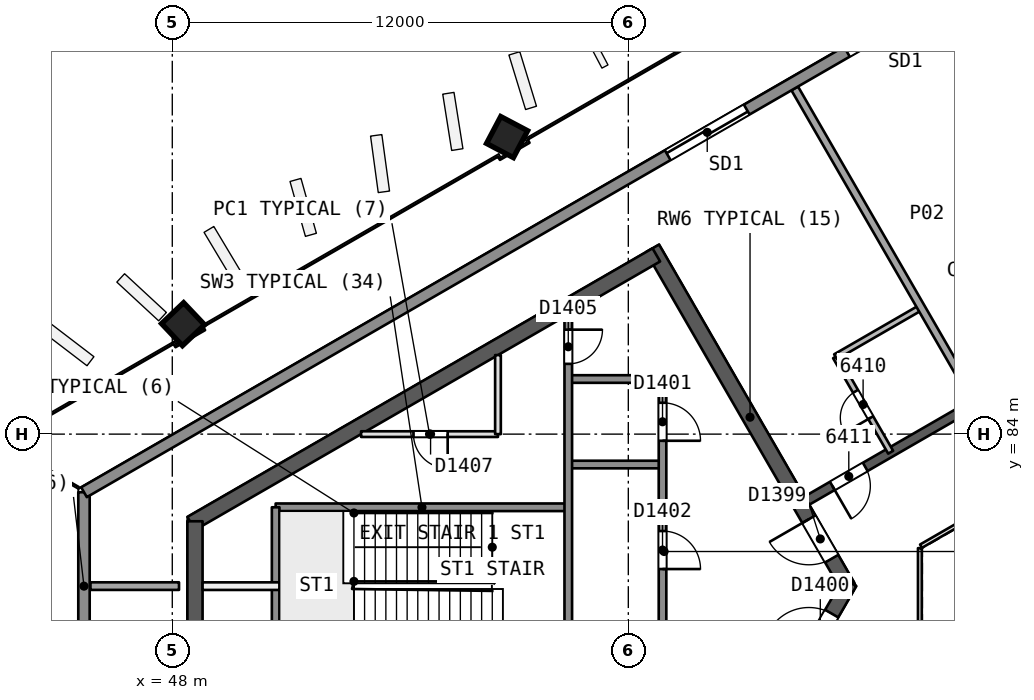
"""IFC4 building model, lengths in metres.
Left out: names, types, materials, properties, quantities, classifications, styles, units other than length and angle.
Written with IfcOpenShell. Run it as: python <this file> out.ifc"""

import sys

from ifc_helpers import new_model, si_unit, direction, frame, frame_2d, origin, origin_2d, place, context, subcontext, project, spatial, rectangle, extrude, element, fill, save


model = new_model("IFC4")
c1 = context("Model", 3, precision=1e-05, world=origin(), true_north=direction((0.0, 1.0)))
c2 = subcontext(c1, "Body", "Model", "MODEL_VIEW")
j1 = project(units=[si_unit("LENGTHUNIT", "METRE"), si_unit("PLANEANGLEUNIT", "RADIAN")], contexts=[c1])
p1 = place(None, origin())
s1 = spatial("IfcSite", under=j1, at=p1, CompositionType="ELEMENT")
p2 = place(p1, origin())
s2 = spatial("IfcBuilding", under=s1, at=p2, CompositionType="ELEMENT")
p3 = place(p2, frame((0.0, 0.0, 262.7)))
s3 = spatial("IfcBuildingStorey", under=s2, at=p3, CompositionType="ELEMENT", Elevation=262.7)
p4 = place(p3, frame((65.769, 80.0, 0.0), z_axis=(0.0, 0.0, 1.0), x_axis=(-0.50000177223, 0.866024380585, 0.0)))
e1 = element("IfcWall", 1, at=p4, inside=s3, PredefinedType="SHEAR", context=c2, shape_type="SweptSolid", body=[
    extrude(rectangle(XDim=10.265, YDim=0.4, at=frame_2d((5.132, 0.0))), origin(), (0.0, 0.0, 1.0), 3.7),
])
p5 = place(p4, frame((0.834, 0.0, 0.0)))
e2 = element("IfcOpeningElement", 2, at=p5, cuts=e1, PredefinedType="OPENING", context=c2, shape_type="SweptSolid", body=[
    extrude(rectangle(XDim=1.2, YDim=2.1, at=frame_2d((0.6, 1.05))), frame((0.0, 0.21, 0.0), z_axis=(0.0, -1.0, 0.0), x_axis=(1.0, 0.0, 0.0)), (0.0, 0.0, 1.0), 0.421),
])
p6 = place(p3, frame((60.737, 88.716, 0.0), z_axis=(0.0, 0.0, 1.0), x_axis=(-0.866028812667, -0.499994095595, 0.0)))
e3 = element("IfcWall", 3, at=p6, inside=s3, PredefinedType="SHEAR", context=c2, shape_type="SweptSolid", body=[
    extrude(rectangle(XDim=14.134, YDim=0.4, at=frame_2d((7.067, 0.0))), origin(), (0.0, 0.0, 1.0), 3.7),
])
p7 = place(p3, frame((48.597, 81.707, 0.0), z_axis=(0.0, 0.0, 1.0), x_axis=(0.0, -1.0, 0.0)))
e4 = element("IfcWall", 4, at=p7, inside=s3, PredefinedType="SHEAR", context=c2, shape_type="SweptSolid", body=[
    extrude(rectangle(XDim=3.53, YDim=0.4, at=frame_2d((1.765, 0.0))), origin(), (0.0, 0.0, 1.0), 3.7),
])
p8 = place(p3, frame((60.737, 71.284, 0.0), z_axis=(0.0, 0.0, 1.0), x_axis=(0.50000547566, 0.866022242388, 0.0)))
e5 = element("IfcWall", 5, at=p8, inside=s3, PredefinedType="SHEAR", context=c2, shape_type="SweptSolid", body=[
    extrude(rectangle(XDim=10.18, YDim=0.4, at=frame_2d((5.09, 0.0))), origin(), (0.0, 0.0, 1.0), 3.7),
])
p9 = place(p8, frame((8.03, 0.0, 0.0)))
e6 = element("IfcOpeningElement", 6, at=p9, cuts=e5, PredefinedType="OPENING", context=c2, shape_type="SweptSolid", body=[
    extrude(rectangle(XDim=1.2, YDim=2.1, at=frame_2d((0.6, 1.05))), frame((0.0, 0.21, 0.0), z_axis=(0.0, -1.0, 0.0), x_axis=(1.0, 0.0, 0.0)), (0.0, 0.0, 1.0), 0.421),
])
p10 = place(p3, frame((78.2, 90.046, 0.0), z_axis=(0.0, 0.0, 1.0), x_axis=(-0.866026492143, -0.499998114903, 0.0)))
e7 = element("IfcWall", 7, at=p10, inside=s3, PredefinedType="SHEAR", context=c2, shape_type="SweptSolid", body=[
    extrude(rectangle(XDim=15.588, YDim=0.25, at=frame_2d((7.794, 0.0))), origin(), (0.0, 0.0, 1.0), 3.3),
])
p11 = place(p10, frame((7.072, 0.0, 0.0)))
e8 = element("IfcOpeningElement", 8, at=p11, cuts=e7, PredefinedType="OPENING", context=c2, shape_type="SweptSolid", body=[
    extrude(rectangle(XDim=1.0, YDim=2.1, at=frame_2d((0.5, 1.05))), frame((0.0, 0.135, 0.0), z_axis=(0.0, -1.0, 0.0), x_axis=(1.0, 0.0, 0.0)), (0.0, 0.0, 1.0), 0.271),
])
p12 = place(p10, frame((13.816, 0.0, 0.0)))
e9 = element("IfcOpeningElement", 9, at=p12, cuts=e7, PredefinedType="OPENING", context=c2, shape_type="SweptSolid", body=[
    extrude(rectangle(XDim=1.0, YDim=2.1, at=frame_2d((0.5, 1.05))), frame((0.0, 0.135, 0.0), z_axis=(0.0, -1.0, 0.0), x_axis=(1.0, 0.0, 0.0)), (0.0, 0.0, 1.0), 0.271),
])
p13 = place(p3, frame((56.786, 91.83, 0.0), z_axis=(0.019328516974, -0.012138044789, 0.999739504221), x_axis=(-0.500200160538, 0.865674608258, 0.020180981521)))
e10 = element("IfcColumn", 10, at=p13, inside=s3, PredefinedType="COLUMN", context=c2, shape_type="SweptSolid", body=[
    extrude(rectangle(XDim=0.8, YDim=0.8, at=origin_2d()), origin(), (0.0, 0.0, 1.0), 3.701),
])
p14 = place(p3, frame((48.249, 86.901, 0.0), z_axis=(0.02855911485, -0.006793507689, 0.999569019734), x_axis=(-0.500405785832, 0.865555785013, 0.020180003373)))
e11 = element("IfcColumn", 11, at=p14, inside=s3, PredefinedType="COLUMN", context=c2, shape_type="SweptSolid", body=[
    extrude(rectangle(XDim=0.8, YDim=0.8, at=origin_2d()), origin(), (0.0, 0.0, 1.0), 3.702),
])
p15 = place(p3, frame((64.378, 93.097, 0.0), z_axis=(0.0, 0.0, 1.0), x_axis=(0.500006352507, -0.866021736132, 0.0)))
e12 = element("IfcWall", 12, at=p15, inside=s3, PredefinedType="PARTITIONING", context=c2, shape_type="SweptSolid", body=[
    extrude(rectangle(XDim=9.553, YDim=0.2, at=frame_2d((4.777, 0.0))), origin(), (0.0, 0.0, 1.0), 3.3),
])
p16 = place(p3, frame((66.903, 83.524, 0.0), z_axis=(0.0, 0.0, 1.0), x_axis=(-0.499987231761, 0.866032775405, 0.0)))
e13 = element("IfcWall", 13, at=p16, inside=s3, PredefinedType="PARTITIONING", context=c2, shape_type="SweptSolid", body=[
    extrude(rectangle(XDim=2.9, YDim=0.15, at=frame_2d((1.45, 0.0))), origin(), (0.0, 0.0, 1.0), 3.3),
])
p17 = place(p16, frame((1.05, 0.0, 0.0)))
e14 = element("IfcOpeningElement", 14, at=p17, cuts=e13, PredefinedType="OPENING", context=c2, shape_type="SweptSolid", body=[
    extrude(rectangle(XDim=0.8, YDim=2.1, at=frame_2d((0.4, 1.05))), frame((0.0, 0.085, 0.0), z_axis=(0.0, -1.0, 0.0), x_axis=(1.0, 0.0, 0.0)), (0.0, 0.0, 1.0), 0.171),
])
p18 = place(p3, frame((65.453, 86.035, 0.0), z_axis=(0.0, 0.0, 1.0), x_axis=(0.866021400173, 0.500006934395, 0.0)))
e15 = element("IfcWall", 15, at=p18, inside=s3, PredefinedType="PARTITIONING", context=c2, shape_type="SweptSolid", body=[
    extrude(rectangle(XDim=2.6, YDim=0.15, at=frame_2d((1.3, 0.0))), origin(), (0.0, 0.0, 1.0), 3.3),
])
p19 = place(p3, frame((45.846, 80.001, 0.0), z_axis=(0.0, 0.0, 1.0), x_axis=(1.0, 0.0, 0.0)))
e16 = element("IfcWall", 16, at=p19, inside=s3, PredefinedType="PARTITIONING", context=c2, shape_type="SweptSolid", body=[
    extrude(rectangle(XDim=2.331, YDim=0.2, at=frame_2d((1.165, 0.0))), origin(), (0.0, 0.0, 1.0), 3.3),
])
p20 = place(p3, frame((45.676, 77.529, 0.0), z_axis=(0.0, 0.0, 1.0), x_axis=(0.0, 1.0, 0.0)))
e17 = element("IfcWall", 17, at=p20, inside=s3, PredefinedType="SOLIDWALL", context=c2, shape_type="SweptSolid", body=[
    extrude(rectangle(XDim=4.943, YDim=0.3, at=frame_2d((2.471, 0.0))), origin(), (0.0, 0.0, 1.0), 3.3),
])
p21 = place(p3, frame((45.676, 82.471, 0.0), z_axis=(0.0, 0.0, 1.0), x_axis=(0.866026894696, 0.499997417657, 0.0)))
e18 = element("IfcWall", 18, at=p21, inside=s3, PredefinedType="SOLIDWALL", context=c2, shape_type="SweptSolid", body=[
    extrude(rectangle(XDim=48.319, YDim=0.3, at=frame_2d((24.159, 0.0))), origin(), (0.0, 0.0, 1.0), 3.3),
])
p22 = place(p21, frame((39.279, 0.0, 0.9)))
e19 = element("IfcOpeningElement", 19, at=p22, cuts=e18, PredefinedType="OPENING", context=c2, shape_type="SweptSolid", body=[
    extrude(rectangle(XDim=1.8, YDim=1.5, at=frame_2d((0.9, 0.75))), frame((0.0, 0.161, 0.0), z_axis=(0.0, -1.0, 0.0), x_axis=(1.0, 0.0, 0.0)), (0.0, 0.0, 1.0), 0.321),
])
p23 = place(p21, frame((28.404, 0.0, 0.0)))
e20 = element("IfcOpeningElement", 20, at=p23, cuts=e18, PredefinedType="OPENING", context=c2, shape_type="SweptSolid", body=[
    extrude(rectangle(XDim=2.4, YDim=2.4, at=frame_2d((1.2, 1.2))), frame((0.0, 0.161, 0.0), z_axis=(0.0, -1.0, 0.0), x_axis=(1.0, 0.0, 0.0)), (0.0, 0.0, 1.0), 0.321),
])
p24 = place(p21, frame((23.181, 0.0, 0.0)))
e21 = element("IfcOpeningElement", 21, at=p24, cuts=e18, PredefinedType="OPENING", context=c2, shape_type="SweptSolid", body=[
    extrude(rectangle(XDim=2.4, YDim=2.4, at=frame_2d((1.2, 1.2))), frame((0.0, 0.161, 0.0), z_axis=(0.0, -1.0, 0.0), x_axis=(1.0, 0.0, 0.0)), (0.0, 0.0, 1.0), 0.321),
])
p25 = place(p21, frame((17.737, 0.0, 0.0)))
e22 = element("IfcOpeningElement", 22, at=p25, cuts=e18, PredefinedType="OPENING", context=c2, shape_type="SweptSolid", body=[
    extrude(rectangle(XDim=2.4, YDim=2.4, at=frame_2d((1.2, 1.2))), frame((0.0, 0.161, 0.0), z_axis=(0.0, -1.0, 0.0), x_axis=(1.0, 0.0, 0.0)), (0.0, 0.0, 1.0), 0.321),
])
p26 = place(p3, frame((60.9, 85.45, 0.0), z_axis=(0.0, 0.0, 1.0), x_axis=(-1.0, 0.0, 0.0)))
e23 = element("IfcWall", 23, at=p26, inside=s3, PredefinedType="SOLIDWALL", context=c2, shape_type="SweptSolid", body=[
    extrude(rectangle(XDim=2.48, YDim=0.2, at=frame_2d((1.24, 0.0))), origin(), (0.0, 0.0, 1.0), 3.3),
])
p27 = place(p3, frame((56.57, 84.0, 0.0), z_axis=(0.0, 0.0, 1.0), x_axis=(-1.0, 0.0, 0.0)))
e24 = element("IfcWall", 24, at=p27, inside=s3, PredefinedType="PARTITIONING", context=c2, shape_type="SweptSolid", body=[
    extrude(rectangle(XDim=3.602, YDim=0.15, at=frame_2d((1.801, 0.0))), origin(), (0.0, 0.0, 1.0), 3.3),
])
p28 = place(p27, frame((1.323, 0.0, 0.0)))
e25 = element("IfcOpeningElement", 25, at=p28, cuts=e24, PredefinedType="OPENING", context=c2, shape_type="SweptSolid", body=[
    extrude(rectangle(XDim=0.9, YDim=2.1, at=frame_2d((0.45, 1.05))), frame((0.0, 0.085, 0.0), z_axis=(0.0, -1.0, 0.0), x_axis=(1.0, 0.0, 0.0)), (0.0, 0.0, 1.0), 0.171),
])
p29 = place(p3, frame((60.9, 83.2, 0.0), z_axis=(0.0, 0.0, 1.0), x_axis=(-1.0, 0.0, 0.0)))
e26 = element("IfcWall", 26, at=p29, inside=s3, PredefinedType="SOLIDWALL", context=c2, shape_type="SweptSolid", body=[
    extrude(rectangle(XDim=2.48, YDim=0.2, at=frame_2d((1.24, 0.0))), origin(), (0.0, 0.0, 1.0), 3.3),
])
p30 = place(p3, frame((58.42, 82.075, 0.0), z_axis=(0.0, 0.0, 1.0), x_axis=(-1.0, 0.0, 0.0)))
e27 = element("IfcWall", 27, at=p30, inside=s3, PredefinedType="SOLIDWALL", context=c2, shape_type="SweptSolid", body=[
    extrude(rectangle(XDim=7.7, YDim=0.2, at=frame_2d((3.85, 0.0))), origin(), (0.0, 0.0, 1.0), 3.3),
])
p31 = place(p3, frame((50.82, 80.0, 0.0), z_axis=(0.0, 0.0, 1.0), x_axis=(-1.0, 0.0, 0.0)))
e28 = element("IfcWall", 28, at=p31, inside=s3, PredefinedType="PARTITIONING", context=c2, shape_type="SweptSolid", body=[
    extrude(rectangle(XDim=2.023, YDim=0.2, at=frame_2d((1.012, 0.0))), origin(), (0.0, 0.0, 1.0), 3.3),
])
p32 = place(p3, frame((60.9, 85.45, 0.0), z_axis=(0.0, 0.0, 1.0), x_axis=(0.0, -1.0, 0.0)))
e29 = element("IfcWall", 29, at=p32, inside=s3, PredefinedType="SOLIDWALL", context=c2, shape_type="SweptSolid", body=[
    extrude(rectangle(XDim=10.9, YDim=0.2, at=frame_2d((5.45, 0.0))), origin(), (0.0, 0.0, 1.0), 3.3),
])
p33 = place(p32, frame((0.625, 0.0, 0.0)))
e30 = element("IfcOpeningElement", 30, at=p33, cuts=e29, PredefinedType="OPENING", context=c2, shape_type="SweptSolid", body=[
    extrude(rectangle(XDim=1.0, YDim=2.1, at=frame_2d((0.5, 1.05))), frame((0.0, 0.11, 0.0), z_axis=(0.0, -1.0, 0.0), x_axis=(1.0, 0.0, 0.0)), (0.0, 0.0, 1.0), 0.221),
])
p34 = place(p32, frame((4.0, 0.0, 0.0)))
e31 = element("IfcOpeningElement", 31, at=p34, cuts=e29, PredefinedType="OPENING", context=c2, shape_type="SweptSolid", body=[
    extrude(rectangle(XDim=1.0, YDim=2.1, at=frame_2d((0.5, 1.05))), frame((0.0, 0.11, 0.0), z_axis=(0.0, -1.0, 0.0), x_axis=(1.0, 0.0, 0.0)), (0.0, 0.0, 1.0), 0.221),
])
p35 = place(p32, frame((7.375, 0.0, 0.0)))
e32 = element("IfcOpeningElement", 32, at=p35, cuts=e29, PredefinedType="OPENING", context=c2, shape_type="SweptSolid", body=[
    extrude(rectangle(XDim=1.0, YDim=2.1, at=frame_2d((0.5, 1.05))), frame((0.0, 0.11, 0.0), z_axis=(0.0, -1.0, 0.0), x_axis=(1.0, 0.0, 0.0)), (0.0, 0.0, 1.0), 0.221),
])
p36 = place(p3, frame((58.42, 87.148, 0.0), z_axis=(0.0, 0.0, 1.0), x_axis=(0.0, -1.0, 0.0)))
e33 = element("IfcWall", 33, at=p36, inside=s3, PredefinedType="SOLIDWALL", context=c2, shape_type="SweptSolid", body=[
    extrude(rectangle(XDim=10.698, YDim=0.2, at=frame_2d((5.349, 0.0))), origin(), (0.0, 0.0, 1.0), 3.3),
])
p37 = place(p36, frame((0.399, 0.0, 0.0)))
e34 = element("IfcOpeningElement", 34, at=p37, cuts=e33, PredefinedType="OPENING", context=c2, shape_type="SweptSolid", body=[
    extrude(rectangle(XDim=0.9, YDim=2.1, at=frame_2d((0.45, 1.05))), frame((0.0, 0.11, 0.0), z_axis=(0.0, -1.0, 0.0), x_axis=(1.0, 0.0, 0.0)), (0.0, 0.0, 1.0), 0.221),
])
p38 = place(p3, frame((56.57, 86.08, 0.0), z_axis=(0.0, 0.0, 1.0), x_axis=(0.0, -1.0, 0.0)))
e35 = element("IfcWall", 35, at=p38, inside=s3, PredefinedType="PARTITIONING", context=c2, shape_type="SweptSolid", body=[
    extrude(rectangle(XDim=2.08, YDim=0.15, at=frame_2d((1.04, 0.0))), origin(), (0.0, 0.0, 1.0), 3.3),
])
p39 = place(p3, frame((50.72, 82.075, 0.0), z_axis=(0.0, 0.0, 1.0), x_axis=(0.0, -1.0, 0.0)))
e36 = element("IfcWall", 36, at=p39, inside=s3, PredefinedType="SOLIDWALL", context=c2, shape_type="SweptSolid", body=[
    extrude(rectangle(XDim=4.15, YDim=0.2, at=frame_2d((2.075, 0.0))), origin(), (0.0, 0.0, 1.0), 3.3),
])
p40 = place(p3, frame((77.738, 86.846, 0.0), z_axis=(0.0, 0.0, 1.0), x_axis=(-0.866026658274, -0.499997827154, 0.0)))
e37 = element("IfcWall", 37, at=p40, inside=s3, PredefinedType="PARTITIONING", context=c2, shape_type="SweptSolid", body=[
    extrude(rectangle(XDim=11.588, YDim=0.1, at=frame_2d((5.794, 0.0))), origin(), (0.0, 0.0, 1.0), 3.3),
])
p41 = place(p3, frame((67.672, 81.0, 0.0), z_axis=(0.0, 0.0, 1.0), x_axis=(0.0, -1.0, 0.0)))
e38 = element("IfcWall", 38, at=p41, inside=s3, PredefinedType="PARTITIONING", context=c2, shape_type="SweptSolid", body=[
    extrude(rectangle(XDim=2.0, YDim=0.1, at=frame_2d((1.0, 0.0))), origin(), (0.0, 0.0, 1.0), 3.3),
])
p42 = place(p17, origin())
e39 = element("IfcDoor", 39, at=p42, inside=s3, OperationType="SINGLE_SWING_LEFT", PredefinedType="NOTDEFINED", context=c2, shape_type="SweptSolid", body=[
    extrude(rectangle(XDim=0.8, YDim=2.1, at=frame_2d((0.4, 1.05))), frame((0.0, 0.025, 0.0), z_axis=(0.0, -1.0, 0.0), x_axis=(1.0, 0.0, 0.0)), (0.0, 0.0, 1.0), 0.05),
])
fill(e14, e39)
p43 = place(p12, origin())
e40 = element("IfcDoor", 40, at=p43, inside=s3, OperationType="SINGLE_SWING_RIGHT", PredefinedType="NOTDEFINED", context=c2, shape_type="SweptSolid", body=[
    extrude(rectangle(XDim=1.0, YDim=2.1, at=frame_2d((0.5, 1.05))), frame((0.0, 0.025, 0.0), z_axis=(0.0, -1.0, 0.0), x_axis=(1.0, 0.0, 0.0)), (0.0, 0.0, 1.0), 0.05),
])
fill(e9, e40)
p44 = place(p24, origin())
e41 = element("IfcDoor", 41, at=p44, inside=s3, OperationType="SLIDING_TO_RIGHT", PredefinedType="NOTDEFINED", context=c2, shape_type="SweptSolid", body=[
    extrude(rectangle(XDim=2.4, YDim=2.4, at=frame_2d((1.2, 1.2))), frame((0.0, 0.025, 0.0), z_axis=(0.0, -1.0, 0.0), x_axis=(1.0, 0.0, 0.0)), (0.0, 0.0, 1.0), 0.05),
])
fill(e21, e41)
p45 = place(p25, origin())
e42 = element("IfcDoor", 42, at=p45, inside=s3, OperationType="SLIDING_TO_LEFT", PredefinedType="NOTDEFINED", context=c2, shape_type="SweptSolid", body=[
    extrude(rectangle(XDim=2.4, YDim=2.4, at=frame_2d((1.2, 1.2))), frame((0.0, 0.025, 0.0), z_axis=(0.0, -1.0, 0.0), x_axis=(1.0, 0.0, 0.0)), (0.0, 0.0, 1.0), 0.05),
])
fill(e22, e42)
p46 = place(p5, origin())
e43 = element("IfcDoor", 43, at=p46, inside=s3, OperationType="SINGLE_SWING_RIGHT", PredefinedType="NOTDEFINED", context=c2, shape_type="SweptSolid", body=[
    extrude(rectangle(XDim=1.2, YDim=2.1, at=frame_2d((0.6, 1.05))), frame((0.0, 0.025, 0.0), z_axis=(0.0, -1.0, 0.0), x_axis=(1.0, 0.0, 0.0)), (0.0, 0.0, 1.0), 0.05),
])
fill(e2, e43)
p47 = place(p9, origin())
e44 = element("IfcDoor", 44, at=p47, inside=s3, OperationType="SINGLE_SWING_LEFT", PredefinedType="NOTDEFINED", context=c2, shape_type="SweptSolid", body=[
    extrude(rectangle(XDim=1.2, YDim=2.1, at=frame_2d((0.6, 1.05))), frame((0.0, 0.025, 0.0), z_axis=(0.0, -1.0, 0.0), x_axis=(1.0, 0.0, 0.0)), (0.0, 0.0, 1.0), 0.05),
])
fill(e6, e44)
p48 = place(p33, origin())
e45 = element("IfcDoor", 45, at=p48, inside=s3, OperationType="SINGLE_SWING_RIGHT", PredefinedType="NOTDEFINED", context=c2, shape_type="SweptSolid", body=[
    extrude(rectangle(XDim=1.0, YDim=2.1, at=frame_2d((0.5, 1.05))), frame((0.0, 0.025, 0.0), z_axis=(0.0, -1.0, 0.0), x_axis=(1.0, 0.0, 0.0)), (0.0, 0.0, 1.0), 0.05),
])
fill(e30, e45)
p49 = place(p34, origin())
e46 = element("IfcDoor", 46, at=p49, inside=s3, OperationType="SINGLE_SWING_RIGHT", PredefinedType="NOTDEFINED", context=c2, shape_type="SweptSolid", body=[
    extrude(rectangle(XDim=1.0, YDim=2.1, at=frame_2d((0.5, 1.05))), frame((0.0, 0.025, 0.0), z_axis=(0.0, -1.0, 0.0), x_axis=(1.0, 0.0, 0.0)), (0.0, 0.0, 1.0), 0.05),
])
fill(e31, e46)
p50 = place(p37, origin())
e47 = element("IfcDoor", 47, at=p50, inside=s3, OperationType="SINGLE_SWING_LEFT", PredefinedType="NOTDEFINED", context=c2, shape_type="SweptSolid", body=[
    extrude(rectangle(XDim=0.9, YDim=2.1, at=frame_2d((0.45, 1.05))), frame((0.0, 0.025, 0.0), z_axis=(0.0, -1.0, 0.0), x_axis=(1.0, 0.0, 0.0)), (0.0, 0.0, 1.0), 0.05),
])
fill(e34, e47)
p51 = place(p28, origin())
e48 = element("IfcDoor", 48, at=p51, inside=s3, OperationType="SINGLE_SWING_LEFT", PredefinedType="NOTDEFINED", context=c2, shape_type="SweptSolid", body=[
    extrude(rectangle(XDim=0.9, YDim=2.1, at=frame_2d((0.45, 1.05))), frame((0.0, 0.025, 0.0), z_axis=(0.0, -1.0, 0.0), x_axis=(1.0, 0.0, 0.0)), (0.0, 0.0, 1.0), 0.05),
])
fill(e25, e48)
save(model, sys.argv[1])
